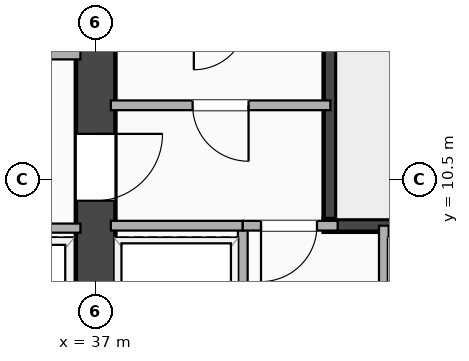
"""IFC4 building model, lengths in metres.
Left out: names, types, materials, properties, quantities, classifications, styles, units other than length and angle.
Written with IfcOpenShell. Run it as: python <this file> out.ifc"""

import sys

from ifc_helpers import new_model, si_unit, direction, frame, frame_2d, origin, place, context, subcontext, project, spatial, rectangle, extrude, element, fill, save


model = new_model("IFC4")
c1 = context("Model", 3, precision=1e-05, world=origin(), true_north=direction((0.0, 1.0)))
c2 = subcontext(c1, "Body", "Model", "MODEL_VIEW")
j1 = project(units=[si_unit("LENGTHUNIT", "METRE"), si_unit("PLANEANGLEUNIT", "RADIAN")], contexts=[c1])
p1 = place(None, origin())
s1 = spatial("IfcSite", under=j1, at=p1, CompositionType="ELEMENT")
p2 = place(p1, origin())
s2 = spatial("IfcBuilding", under=s1, at=p2, CompositionType="ELEMENT")
p3 = place(p2, frame((0.0, 0.0, 71.9)))
s3 = spatial("IfcBuildingStorey", under=s2, at=p3, CompositionType="ELEMENT", Elevation=71.9)
p4 = place(p3, frame((37.0, 3.5, 0.0), z_axis=(0.0, 0.0, 1.0), x_axis=(0.0, 1.0, 0.0)))
e1 = element("IfcWall", 1, at=p4, inside=s3, PredefinedType="SHEAR", context=c2, shape_type="SweptSolid", body=[
    extrude(rectangle(XDim=16.9, YDim=0.65, at=frame_2d((8.45, 0.0))), origin(), (0.0, 0.0, 1.0), 3.18),
])
p5 = place(p4, frame((6.65, 0.0, 0.0)))
e2 = element("IfcOpeningElement", 2, at=p5, cuts=e1, PredefinedType="OPENING", context=c2, shape_type="SweptSolid", body=[
    extrude(rectangle(XDim=1.1, YDim=2.15, at=frame_2d((0.55, 1.075))), frame((0.0, 0.335, 0.0), z_axis=(0.0, -1.0, 0.0), x_axis=(1.0, 0.0, 0.0)), (0.0, 0.0, 1.0), 0.67),
])
p6 = place(p3, frame((40.855, 9.745, 0.0), z_axis=(0.0, 0.0, 1.0), x_axis=(0.0, 1.0, 0.0)))
e3 = element("IfcWall", 3, at=p6, inside=s3, PredefinedType="SHEAR", context=c2, shape_type="SweptSolid", body=[
    extrude(rectangle(XDim=8.01, YDim=0.21, at=frame_2d((4.005, 0.0))), origin(), (0.0, 0.0, 1.0), 3.18),
])
p7 = place(p3, frame((40.75, 9.745, 0.0), z_axis=(0.0, 0.0, 1.0), x_axis=(1.0, 0.0, 0.0)))
e4 = element("IfcWall", 4, at=p7, inside=s3, PredefinedType="SHEAR", context=c2, shape_type="SweptSolid", body=[
    extrude(rectangle(XDim=3.66, YDim=0.21, at=frame_2d((1.83, 0.0))), origin(), (0.0, 0.0, 1.0), 3.18),
])
p8 = place(p3, frame((37.25, 11.72, 0.0), z_axis=(0.0, 0.0, 1.0), x_axis=(1.0, 0.0, 0.0)))
e5 = element("IfcWall", 5, at=p8, inside=s3, PredefinedType="PARTITIONING", context=c2, shape_type="SweptSolid", body=[
    extrude(rectangle(XDim=3.61, YDim=0.16, at=frame_2d((1.805, 0.0))), origin(), (0.0, 0.0, 1.0), 3.18),
])
p9 = place(p8, frame((1.345, 0.0, 0.0)))
e6 = element("IfcOpeningElement", 6, at=p9, cuts=e5, PredefinedType="OPENING", context=c2, shape_type="SweptSolid", body=[
    extrude(rectangle(XDim=0.92, YDim=2.08, at=frame_2d((0.46, 1.04))), frame((0.0, 0.09, 0.0), z_axis=(0.0, -1.0, 0.0), x_axis=(1.0, 0.0, 0.0)), (0.0, 0.0, 1.0), 0.18),
])
for number, where, z_axis, x_axis in (
    (7, (39.42, 3.9, 0.0), (0.0, 0.0, 1.0), (0.0, 1.0, 0.0)),
    (8, (41.74, 3.9, 0.0), (0.0, 0.0, 1.0), (0.0, 1.0, 0.0)),
):
    element("IfcWall", number, at=place(p3, frame(where, z_axis=z_axis, x_axis=x_axis)), inside=s3, PredefinedType="PARTITIONING", context=c2, shape_type="SweptSolid", body=[
        extrude(rectangle(XDim=5.84, YDim=0.16, at=frame_2d((2.92, 0.0))), origin(), (0.0, 0.0, 1.0), 3.18),
    ])
p10 = place(p3, frame((37.25, 9.74, 0.0), z_axis=(0.0, 0.0, 1.0), x_axis=(1.0, 0.0, 0.0)))
e9 = element("IfcWall", 9, at=p10, inside=s3, PredefinedType="PARTITIONING", context=c2, shape_type="SweptSolid", body=[
    extrude(rectangle(XDim=2.17, YDim=0.16, at=frame_2d((1.085, 0.0))), origin(), (0.0, 0.0, 1.0), 3.18),
])
p11 = place(p3, frame((39.42, 9.74, 0.0), z_axis=(0.0, 0.0, 1.0), x_axis=(1.0, 0.0, 0.0)))
e10 = element("IfcWall", 10, at=p11, inside=s3, PredefinedType="PARTITIONING", context=c2, shape_type="SweptSolid", body=[
    extrude(rectangle(XDim=1.56, YDim=0.16, at=frame_2d((0.78, 0.0))), origin(), (0.0, 0.0, 1.0), 3.18),
])
p12 = place(p11, frame((0.3, 0.0, 0.0)))
e11 = element("IfcOpeningElement", 11, at=p12, cuts=e10, PredefinedType="OPENING", context=c2, shape_type="SweptSolid", body=[
    extrude(rectangle(XDim=0.92, YDim=2.08, at=frame_2d((0.46, 1.04))), frame((0.0, 0.09, 0.0), z_axis=(0.0, -1.0, 0.0), x_axis=(1.0, 0.0, 0.0)), (0.0, 0.0, 1.0), 0.18),
])
for number, where, z_axis, x_axis in (
    (12, (34.48, 9.7, 0.0), (0.0, 0.0, 1.0), (1.0, 0.0, 0.0)),
    (13, (34.48, 12.55, 0.0), (0.0, 0.0, 1.0), (1.0, 0.0, 0.0)),
):
    element("IfcWall", number, at=place(p3, frame(where, z_axis=z_axis, x_axis=x_axis)), inside=s3, PredefinedType="PARTITIONING", context=c2, shape_type="SweptSolid", body=[
        extrude(rectangle(XDim=2.27, YDim=0.15, at=frame_2d((1.135, 0.0))), origin(), (0.0, 0.0, 1.0), 3.18),
    ])
p13 = place(p5, origin())
e14 = element("IfcDoor", 14, at=p13, inside=s3, OperationType="SINGLE_SWING_RIGHT", PredefinedType="DOOR", context=c2, shape_type="SweptSolid", body=[
    extrude(rectangle(XDim=1.1, YDim=2.15, at=frame_2d((0.55, 1.075))), frame((0.0, 0.025, 0.0), z_axis=(0.0, -1.0, 0.0), x_axis=(1.0, 0.0, 0.0)), (0.0, 0.0, 1.0), 0.05),
])
fill(e2, e14)
p14 = place(p9, origin())
e15 = element("IfcDoor", 15, at=p14, inside=s3, OperationType="SINGLE_SWING_RIGHT", PredefinedType="DOOR", context=c2, shape_type="SweptSolid", body=[
    extrude(rectangle(XDim=0.92, YDim=2.08, at=frame_2d((0.46, 1.04))), frame((0.0, 0.025, 0.0), z_axis=(0.0, -1.0, 0.0), x_axis=(1.0, 0.0, 0.0)), (0.0, 0.0, 1.0), 0.05),
])
fill(e6, e15)
p15 = place(p12, origin())
e16 = element("IfcDoor", 16, at=p15, inside=s3, OperationType="SINGLE_SWING_LEFT", PredefinedType="DOOR", context=c2, shape_type="SweptSolid", body=[
    extrude(rectangle(XDim=0.92, YDim=2.08, at=frame_2d((0.46, 1.04))), frame((0.0, 0.025, 0.0), z_axis=(0.0, -1.0, 0.0), x_axis=(1.0, 0.0, 0.0)), (0.0, 0.0, 1.0), 0.05),
])
fill(e11, e16)
save(model, sys.argv[1])
